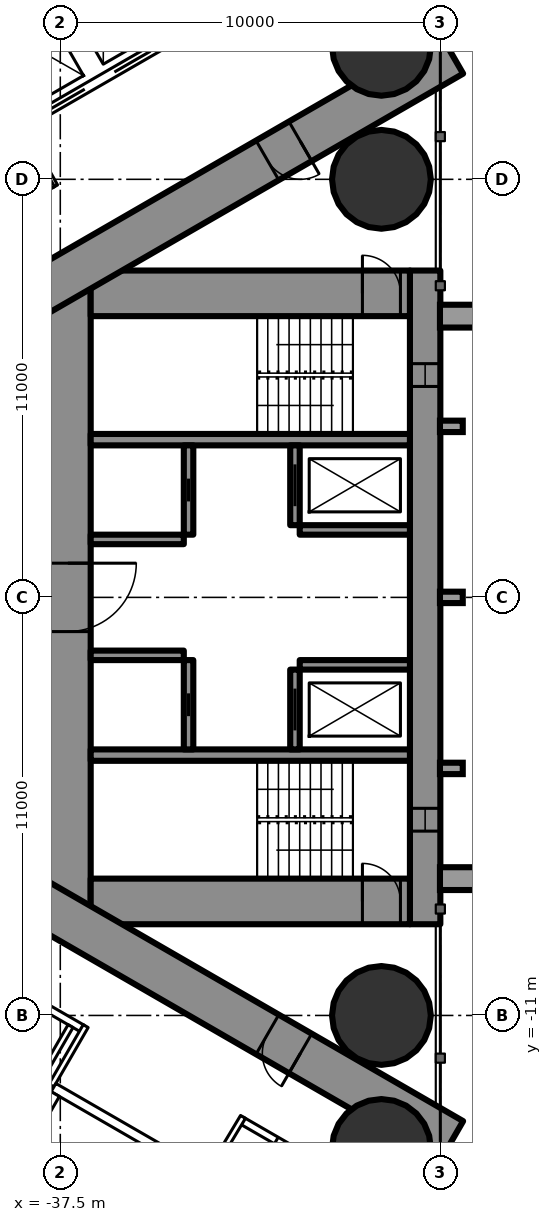
"""IFC4 building model, lengths in metres.
Left out: names, types, materials, properties, quantities, classifications, styles, units other than length and angle.
Written with IfcOpenShell. Run it as: python <this file> out.ifc"""

import sys

from ifc_helpers import new_model, si_unit, direction, frame, frame_2d, origin, origin_2d, place, context, subcontext, project, spatial, rectangle, hollow_circle, extrude, element, fill, save


model = new_model("IFC4")
c1 = context("Model", 3, precision=1e-05, world=origin(), true_north=direction((0.0, 1.0)))
c2 = subcontext(c1, "Body", "Model", "MODEL_VIEW")
j1 = project(units=[si_unit("LENGTHUNIT", "METRE"), si_unit("PLANEANGLEUNIT", "RADIAN")], contexts=[c1])
p1 = place(None, origin())
s1 = spatial("IfcSite", under=j1, at=p1, CompositionType="ELEMENT")
p2 = place(p1, origin())
s2 = spatial("IfcBuilding", under=s1, at=p2, CompositionType="ELEMENT")
p3 = place(p2, frame((0.0, 0.0, 122.1)))
s3 = spatial("IfcBuildingStorey", under=s2, at=p3, CompositionType="ELEMENT", Elevation=122.1)
for number, where, z_axis, x_axis in (
    (1, (-29.05, -11.0, 0.0), (0.0, 0.0, 1.0), (1.0, 0.0, 0.0)),
    (2, (-29.05, 11.0, 0.0), (0.0, 0.0, 1.0), (1.0, 0.0, 0.0)),
    (3, (-29.05, 14.5, 0.0), (0.0, 0.0, 1.0), (1.0, 0.0, 0.0)),
    (4, (-29.05, -14.5, 0.0), (0.0, 0.0, 1.0), (1.0, 0.0, 0.0)),
):
    element("IfcColumn", number, at=place(p3, frame(where, z_axis=z_axis, x_axis=x_axis)), inside=s3, PredefinedType="COLUMN", context=c2, shape_type="SweptSolid", body=[
        extrude(hollow_circle(Radius=1.3, WallThickness=0.1, at=origin_2d()), origin(), (0.0, 0.0, 1.0), 3.5),
    ])
p4 = place(p3, frame((-27.9, 8.6, 0.0), z_axis=(0.0, 0.0, 1.0), x_axis=(0.0, -1.0, 0.0)))
e5 = element("IfcWall", 5, at=p4, inside=s3, PredefinedType="SHEAR", context=c2, shape_type="SweptSolid", body=[
    extrude(rectangle(XDim=17.2, YDim=0.8, at=frame_2d((8.6, 0.0))), origin(), (0.0, 0.0, 1.0), 3.5),
])
p5 = place(p4, frame((2.45, 0.0, 0.6)))
e6 = element("IfcOpeningElement", 6, at=p5, cuts=e5, PredefinedType="OPENING", context=c2, shape_type="SweptSolid", body=[
    extrude(rectangle(XDim=0.6, YDim=2.1, at=frame_2d((0.3, 1.05))), frame((0.0, 0.41, 0.0), z_axis=(0.0, -1.0, 0.0), x_axis=(1.0, 0.0, 0.0)), (0.0, 0.0, 1.0), 0.82),
])
p6 = place(p4, frame((14.15, 0.0, 0.6)))
e7 = element("IfcOpeningElement", 7, at=p6, cuts=e5, PredefinedType="OPENING", context=c2, shape_type="SweptSolid", body=[
    extrude(rectangle(XDim=0.6, YDim=2.1, at=frame_2d((0.3, 1.05))), frame((0.0, 0.41, 0.0), z_axis=(0.0, -1.0, 0.0), x_axis=(1.0, 0.0, 0.0)), (0.0, 0.0, 1.0), 0.82),
])
p7 = place(p3, frame((-37.3, 8.6, 0.0), z_axis=(0.0, 0.0, 1.0), x_axis=(0.0, -1.0, 0.0)))
e8 = element("IfcWall", 8, at=p7, inside=s3, PredefinedType="SHEAR", context=c2, shape_type="SweptSolid", body=[
    extrude(rectangle(XDim=17.2, YDim=1.2, at=frame_2d((8.6, 0.0))), origin(), (0.0, 0.0, 1.0), 3.5),
])
p8 = place(p7, frame((7.7, 0.0, 0.0)))
e9 = element("IfcOpeningElement", 9, at=p8, cuts=e8, PredefinedType="OPENING", context=c2, shape_type="SweptSolid", body=[
    extrude(rectangle(XDim=1.8, YDim=2.2, at=frame_2d((0.9, 1.1))), frame((0.0, 0.61, 0.0), z_axis=(0.0, -1.0, 0.0), x_axis=(1.0, 0.0, 0.0)), (0.0, 0.0, 1.0), 1.22),
])
p9 = place(p3, frame((-28.3, 8.0, 0.0), z_axis=(0.0, 0.0, 1.0), x_axis=(-1.0, 0.0, 0.0)))
e10 = element("IfcWall", 10, at=p9, inside=s3, PredefinedType="SHEAR", context=c2, shape_type="SweptSolid", body=[
    extrude(rectangle(XDim=8.4, YDim=1.2, at=frame_2d((4.2, 0.0))), origin(), (0.0, 0.0, 1.0), 3.5),
])
p10 = place(p9, frame((0.25, 0.0, 0.0)))
e11 = element("IfcOpeningElement", 11, at=p10, cuts=e10, PredefinedType="OPENING", context=c2, shape_type="SweptSolid", body=[
    extrude(rectangle(XDim=1.0, YDim=2.2, at=frame_2d((0.5, 1.1))), frame((0.0, 0.61, 0.0), z_axis=(0.0, -1.0, 0.0), x_axis=(1.0, 0.0, 0.0)), (0.0, 0.0, 1.0), 1.22),
])
p11 = place(p3, frame((-28.3, -8.0, 0.0), z_axis=(0.0, 0.0, 1.0), x_axis=(-1.0, 0.0, 0.0)))
e12 = element("IfcWall", 12, at=p11, inside=s3, PredefinedType="SHEAR", context=c2, shape_type="SweptSolid", body=[
    extrude(rectangle(XDim=8.4, YDim=1.2, at=frame_2d((4.2, 0.0))), origin(), (0.0, 0.0, 1.0), 3.5),
])
p12 = place(p11, frame((0.25, 0.0, 0.0)))
e13 = element("IfcOpeningElement", 13, at=p12, cuts=e12, PredefinedType="OPENING", context=c2, shape_type="SweptSolid", body=[
    extrude(rectangle(XDim=1.0, YDim=2.2, at=frame_2d((0.5, 1.1))), frame((0.0, 0.61, 0.0), z_axis=(0.0, -1.0, 0.0), x_axis=(1.0, 0.0, 0.0)), (0.0, 0.0, 1.0), 1.22),
])
for number, where, z_axis, x_axis in (
    (14, (-28.3, 4.15, 0.0), (0.0, 0.0, 1.0), (-1.0, 0.0, 0.0)),
    (15, (-28.3, -4.15, 0.0), (0.0, 0.0, 1.0), (-1.0, 0.0, 0.0)),
):
    element("IfcWall", number, at=place(p3, frame(where, z_axis=z_axis, x_axis=x_axis)), inside=s3, PredefinedType="SHEAR", context=c2, shape_type="SweptSolid", body=[
        extrude(rectangle(XDim=8.4, YDim=0.3, at=frame_2d((4.2, 0.0))), origin(), (0.0, 0.0, 1.0), 3.5),
    ])
p13 = place(p3, frame((-31.325, 4.0, 0.0), z_axis=(0.0, 0.0, 1.0), x_axis=(0.0, -1.0, 0.0)))
e16 = element("IfcWall", 16, at=p13, inside=s3, PredefinedType="SHEAR", context=c2, shape_type="SweptSolid", body=[
    extrude(rectangle(XDim=2.1, YDim=0.25, at=frame_2d((1.05, 0.0))), origin(), (0.0, 0.0, 1.0), 3.5),
])
p14 = place(p13, frame((0.5, 0.0, 0.0)))
e17 = element("IfcOpeningElement", 17, at=p14, cuts=e16, PredefinedType="OPENING", context=c2, shape_type="SweptSolid", body=[
    extrude(rectangle(XDim=1.1, YDim=2.2, at=frame_2d((0.55, 1.1))), frame((0.0, 0.135, 0.0), z_axis=(0.0, -1.0, 0.0), x_axis=(1.0, 0.0, 0.0)), (0.0, 0.0, 1.0), 0.27),
])
p15 = place(p3, frame((-34.125, 4.0, 0.0), z_axis=(0.0, 0.0, 1.0), x_axis=(0.0, -1.0, 0.0)))
e18 = element("IfcWall", 18, at=p15, inside=s3, PredefinedType="SHEAR", context=c2, shape_type="SweptSolid", body=[
    extrude(rectangle(XDim=2.35, YDim=0.25, at=frame_2d((1.175, 0.0))), origin(), (0.0, 0.0, 1.0), 3.5),
])
p16 = place(p15, frame((0.875, 0.0, 0.0)))
e19 = element("IfcOpeningElement", 19, at=p16, cuts=e18, PredefinedType="OPENING", context=c2, shape_type="SweptSolid", body=[
    extrude(rectangle(XDim=0.6, YDim=2.0, at=frame_2d((0.3, 1.0))), frame((0.0, 0.135, 0.0), z_axis=(0.0, -1.0, 0.0), x_axis=(1.0, 0.0, 0.0)), (0.0, 0.0, 1.0), 0.27),
])
p17 = place(p3, frame((-28.3, 1.775, 0.0), z_axis=(0.0, 0.0, 1.0), x_axis=(-1.0, 0.0, 0.0)))
e20 = element("IfcWall", 20, at=p17, inside=s3, PredefinedType="SHEAR", context=c2, shape_type="SweptSolid", body=[
    extrude(rectangle(XDim=2.9, YDim=0.25, at=frame_2d((1.45, 0.0))), origin(), (0.0, 0.0, 1.0), 3.5),
])
p18 = place(p3, frame((-34.25, 1.525, 0.0), z_axis=(0.0, 0.0, 1.0), x_axis=(-1.0, 0.0, 0.0)))
e21 = element("IfcWall", 21, at=p18, inside=s3, PredefinedType="SHEAR", context=c2, shape_type="SweptSolid", body=[
    extrude(rectangle(XDim=2.45, YDim=0.25, at=frame_2d((1.225, 0.0))), origin(), (0.0, 0.0, 1.0), 3.5),
])
p19 = place(p3, frame((-31.325, -1.9, 0.0), z_axis=(0.0, 0.0, 1.0), x_axis=(0.0, -1.0, 0.0)))
e22 = element("IfcWall", 22, at=p19, inside=s3, PredefinedType="SHEAR", context=c2, shape_type="SweptSolid", body=[
    extrude(rectangle(XDim=2.1, YDim=0.25, at=frame_2d((1.05, 0.0))), origin(), (0.0, 0.0, 1.0), 3.5),
])
p20 = place(p19, frame((0.5, 0.0, 0.0)))
e23 = element("IfcOpeningElement", 23, at=p20, cuts=e22, PredefinedType="OPENING", context=c2, shape_type="SweptSolid", body=[
    extrude(rectangle(XDim=1.1, YDim=2.2, at=frame_2d((0.55, 1.1))), frame((0.0, 0.135, 0.0), z_axis=(0.0, -1.0, 0.0), x_axis=(1.0, 0.0, 0.0)), (0.0, 0.0, 1.0), 0.27),
])
p21 = place(p3, frame((-34.125, -1.65, 0.0), z_axis=(0.0, 0.0, 1.0), x_axis=(0.0, -1.0, 0.0)))
e24 = element("IfcWall", 24, at=p21, inside=s3, PredefinedType="SHEAR", context=c2, shape_type="SweptSolid", body=[
    extrude(rectangle(XDim=2.35, YDim=0.25, at=frame_2d((1.175, 0.0))), origin(), (0.0, 0.0, 1.0), 3.5),
])
p22 = place(p21, frame((0.875, 0.0, 0.0)))
e25 = element("IfcOpeningElement", 25, at=p22, cuts=e24, PredefinedType="OPENING", context=c2, shape_type="SweptSolid", body=[
    extrude(rectangle(XDim=0.6, YDim=2.0, at=frame_2d((0.3, 1.0))), frame((0.0, 0.135, 0.0), z_axis=(0.0, -1.0, 0.0), x_axis=(1.0, 0.0, 0.0)), (0.0, 0.0, 1.0), 0.27),
])
p23 = place(p3, frame((-28.3, -1.775, 0.0), z_axis=(0.0, 0.0, 1.0), x_axis=(-1.0, 0.0, 0.0)))
e26 = element("IfcWall", 26, at=p23, inside=s3, PredefinedType="SHEAR", context=c2, shape_type="SweptSolid", body=[
    extrude(rectangle(XDim=2.9, YDim=0.25, at=frame_2d((1.45, 0.0))), origin(), (0.0, 0.0, 1.0), 3.5),
])
p24 = place(p3, frame((-34.25, -1.525, 0.0), z_axis=(0.0, 0.0, 1.0), x_axis=(-1.0, 0.0, 0.0)))
e27 = element("IfcWall", 27, at=p24, inside=s3, PredefinedType="SHEAR", context=c2, shape_type="SweptSolid", body=[
    extrude(rectangle(XDim=2.45, YDim=0.25, at=frame_2d((1.225, 0.0))), origin(), (0.0, 0.0, 1.0), 3.5),
])
p25 = place(p3, frame((-27.2, 14.3, 0.0), z_axis=(0.0, 0.0, 1.0), x_axis=(-0.866026593062, -0.499997940104, 0.0)))
e28 = element("IfcWall", 28, at=p25, inside=s3, PredefinedType="SHEAR", context=c2, shape_type="SweptSolid", body=[
    extrude(rectangle(XDim=28.946, YDim=1.2, at=frame_2d((14.473, 0.0))), origin(), (0.0, 0.0, 1.0), 3.5),
])
p26 = place(p25, frame((4.6, 0.0, 0.0)))
e29 = element("IfcOpeningElement", 29, at=p26, cuts=e28, PredefinedType="OPENING", context=c2, shape_type="SweptSolid", body=[
    extrude(rectangle(XDim=1.0, YDim=2.2, at=frame_2d((0.5, 1.1))), frame((0.0, 0.61, 0.0), z_axis=(0.0, -1.0, 0.0), x_axis=(1.0, 0.0, 0.0)), (0.0, 0.0, 1.0), 1.22),
])
p27 = place(p25, frame((13.395, 0.0, 0.0)))
e30 = element("IfcOpeningElement", 30, at=p27, cuts=e28, PredefinedType="OPENING", context=c2, shape_type="SweptSolid", body=[
    extrude(rectangle(XDim=1.8, YDim=2.2, at=frame_2d((0.9, 1.1))), frame((0.0, 0.61, 0.0), z_axis=(0.0, -1.0, 0.0), x_axis=(1.0, 0.0, 0.0)), (0.0, 0.0, 1.0), 1.22),
])
p28 = place(p3, frame((-27.2, -14.3, 0.0), z_axis=(0.0, 0.0, 1.0), x_axis=(-0.866024021859, 0.500002393557, 0.0)))
e31 = element("IfcWall", 31, at=p28, inside=s3, PredefinedType="SHEAR", context=c2, shape_type="SweptSolid", body=[
    extrude(rectangle(XDim=27.907, YDim=1.2, at=frame_2d((13.954, 0.0))), origin(), (0.0, 0.0, 1.0), 3.5),
])
p29 = place(p28, frame((4.6, 0.0, 0.0)))
e32 = element("IfcOpeningElement", 32, at=p29, cuts=e31, PredefinedType="OPENING", context=c2, shape_type="SweptSolid", body=[
    extrude(rectangle(XDim=1.0, YDim=2.2, at=frame_2d((0.5, 1.1))), frame((0.0, 0.61, 0.0), z_axis=(0.0, -1.0, 0.0), x_axis=(1.0, 0.0, 0.0)), (0.0, 0.0, 1.0), 1.22),
])
p30 = place(p28, frame((13.395, 0.0, 0.0)))
e33 = element("IfcOpeningElement", 33, at=p30, cuts=e31, PredefinedType="OPENING", context=c2, shape_type="SweptSolid", body=[
    extrude(rectangle(XDim=1.8, YDim=2.2, at=frame_2d((0.9, 1.1))), frame((0.0, 0.61, 0.0), z_axis=(0.0, -1.0, 0.0), x_axis=(1.0, 0.0, 0.0)), (0.0, 0.0, 1.0), 1.22),
])
p31 = place(p3, frame((-27.572, -16.741, 0.0), z_axis=(0.0, 0.0, 1.0), x_axis=(-0.866024464444, 0.500001626982, 0.0)))
e34 = element("IfcWall", 34, at=p31, inside=s3, PredefinedType="PARTITIONING", context=c2, shape_type="SweptSolid", body=[
    extrude(rectangle(XDim=5.955, YDim=0.2, at=frame_2d((2.978, 0.0))), origin(), (0.0, 0.0, 1.0), 3.25),
])
p32 = place(p31, frame((3.95, 0.0, 0.0)))
e35 = element("IfcOpeningElement", 35, at=p32, cuts=e34, PredefinedType="OPENING", context=c2, shape_type="SweptSolid", body=[
    extrude(rectangle(XDim=0.95, YDim=2.2, at=frame_2d((0.475, 1.1))), frame((0.0, 0.11, 0.0), z_axis=(0.0, -1.0, 0.0), x_axis=(1.0, 0.0, 0.0)), (0.0, 0.0, 1.0), 0.22),
])
p33 = place(p3, frame((-36.92, -11.344, 0.0), z_axis=(0.0, 0.0, 1.0), x_axis=(-0.866028313256, 0.499994960614, 0.0)))
e36 = element("IfcWall", 36, at=p33, inside=s3, PredefinedType="PARTITIONING", context=c2, shape_type="SweptSolid", body=[
    extrude(rectangle(XDim=22.568, YDim=0.2, at=frame_2d((11.284, 0.0))), origin(), (0.0, 0.0, 1.0), 3.25),
])
p34 = place(p33, frame((12.131, 0.0, 0.0)))
e37 = element("IfcOpeningElement", 37, at=p34, cuts=e36, PredefinedType="OPENING", context=c2, shape_type="SweptSolid", body=[
    extrude(rectangle(XDim=0.95, YDim=2.2, at=frame_2d((0.475, 1.1))), frame((0.0, 0.11, 0.0), z_axis=(0.0, -1.0, 0.0), x_axis=(1.0, 0.0, 0.0)), (0.0, 0.0, 1.0), 0.22),
])
p35 = place(p33, frame((3.35, 0.0, 0.0)))
e38 = element("IfcOpeningElement", 38, at=p35, cuts=e36, PredefinedType="OPENING", context=c2, shape_type="SweptSolid", body=[
    extrude(rectangle(XDim=1.0, YDim=2.2, at=frame_2d((0.5, 1.1))), frame((0.0, 0.11, 0.0), z_axis=(0.0, -1.0, 0.0), x_axis=(1.0, 0.0, 0.0)), (0.0, 0.0, 1.0), 0.22),
])
p36 = place(p3, frame((-38.513, 12.392, 0.0), z_axis=(0.0, 0.0, 1.0), x_axis=(0.485585508183, -0.874189175317, 0.0)))
e39 = element("IfcWall", 39, at=p36, inside=s3, PredefinedType="PARTITIONING", context=c2, shape_type="SweptSolid", body=[
    extrude(rectangle(XDim=1.805, YDim=0.15, at=frame_2d((0.902, 0.0))), origin(), (0.0, 0.0, 1.0), 3.25),
])
p37 = place(p3, frame((-36.831, -11.28, 0.0), z_axis=(0.0, 0.0, 1.0), x_axis=(-0.499937177781, -0.866061671171, 0.0)))
e40 = element("IfcWall", 40, at=p37, inside=s3, PredefinedType="PARTITIONING", context=c2, shape_type="SweptSolid", body=[
    extrude(rectangle(XDim=1.804, YDim=0.15, at=frame_2d((0.902, 0.0))), origin(), (0.0, 0.0, 1.0), 3.25),
])
p38 = place(p3, frame((-33.621, -15.218, 0.0), z_axis=(0.0, 0.0, 1.0), x_axis=(0.514336634837, 0.857588377991, 0.0)))
e41 = element("IfcWall", 41, at=p38, inside=s3, PredefinedType="PARTITIONING", context=c2, shape_type="SweptSolid", body=[
    extrude(rectangle(XDim=1.805, YDim=0.15, at=frame_2d((0.903, 0.0))), origin(), (0.0, 0.0, 1.0), 3.25),
])
p39 = place(p3, frame((-37.7, 10.894, 0.0), z_axis=(0.0, 0.0, 1.0), x_axis=(-0.866027551079, -0.499996280759, 0.0)))
e42 = element("IfcWall", 42, at=p39, inside=s3, PredefinedType="PARTITIONING", context=c2, shape_type="SweptSolid", body=[
    extrude(rectangle(XDim=10.831, YDim=0.2, at=frame_2d((5.415, 0.0))), origin(), (0.0, 0.0, 1.0), 3.25),
])
p40 = place(p39, frame((6.93, 0.0, 0.0)))
e43 = element("IfcOpeningElement", 43, at=p40, cuts=e42, PredefinedType="OPENING", context=c2, shape_type="SweptSolid", body=[
    extrude(rectangle(XDim=0.95, YDim=2.2, at=frame_2d((0.475, 1.1))), frame((0.0, 0.11, 0.0), z_axis=(0.0, -1.0, 0.0), x_axis=(1.0, 0.0, 0.0)), (0.0, 0.0, 1.0), 0.22),
])
p41 = place(p3, frame((-37.23, -11.281, 0.0), z_axis=(0.0, 0.0, 1.0), x_axis=(-0.500049511043, -0.865996816683, 0.0)))
e44 = element("IfcWall", 44, at=p41, inside=s3, PredefinedType="PARTITIONING", context=c2, shape_type="SweptSolid", body=[
    extrude(rectangle(XDim=2.8, YDim=0.15, at=frame_2d((1.4, 0.0))), origin(), (0.0, 0.0, 1.0), 3.25),
])
p42 = place(p3, frame((-31.01, 16.747, 0.0), z_axis=(0.0, 0.0, 1.0), x_axis=(-0.866028165386, -0.499995216735, 0.0)))
e45 = element("IfcWall", 45, at=p42, inside=s3, PredefinedType="PARTITIONING", context=c2, shape_type="SweptSolid", body=[
    extrude(rectangle(XDim=8.6, YDim=0.25, at=frame_2d((4.3, 0.0))), origin(), (0.0, 0.0, 1.0), 3.25),
])
p43 = place(p42, frame((0.75, 0.0, 0.0)))
e46 = element("IfcOpeningElement", 46, at=p43, cuts=e45, PredefinedType="OPENING", context=c2, shape_type="SweptSolid", body=[
    extrude(rectangle(XDim=1.1, YDim=2.2, at=frame_2d((0.55, 1.1))), frame((0.0, 0.135, 0.0), z_axis=(0.0, -1.0, 0.0), x_axis=(1.0, 0.0, 0.0)), (0.0, 0.0, 1.0), 0.27),
])
p44 = place(p42, frame((2.75, 0.0, 0.0)))
e47 = element("IfcOpeningElement", 47, at=p44, cuts=e45, PredefinedType="OPENING", context=c2, shape_type="SweptSolid", body=[
    extrude(rectangle(XDim=1.1, YDim=2.2, at=frame_2d((0.55, 1.1))), frame((0.0, 0.135, 0.0), z_axis=(0.0, -1.0, 0.0), x_axis=(1.0, 0.0, 0.0)), (0.0, 0.0, 1.0), 0.27),
])
p45 = place(p42, frame((4.75, 0.0, 0.0)))
e48 = element("IfcOpeningElement", 48, at=p45, cuts=e45, PredefinedType="OPENING", context=c2, shape_type="SweptSolid", body=[
    extrude(rectangle(XDim=1.1, YDim=2.2, at=frame_2d((0.55, 1.1))), frame((0.0, 0.135, 0.0), z_axis=(0.0, -1.0, 0.0), x_axis=(1.0, 0.0, 0.0)), (0.0, 0.0, 1.0), 0.27),
])
p46 = place(p42, frame((6.75, 0.0, 0.0)))
e49 = element("IfcOpeningElement", 49, at=p46, cuts=e45, PredefinedType="OPENING", context=c2, shape_type="SweptSolid", body=[
    extrude(rectangle(XDim=1.1, YDim=2.2, at=frame_2d((0.55, 1.1))), frame((0.0, 0.135, 0.0), z_axis=(0.0, -1.0, 0.0), x_axis=(1.0, 0.0, 0.0)), (0.0, 0.0, 1.0), 0.27),
])
p47 = place(p3, frame((-33.696, -15.197, 0.0), z_axis=(0.0, 0.0, 1.0), x_axis=(-0.865976953817, 0.500083908417, 0.0)))
e50 = element("IfcWall", 50, at=p47, inside=s3, PredefinedType="PARTITIONING", context=c2, shape_type="SweptSolid", body=[
    extrude(rectangle(XDim=4.599, YDim=0.25, at=frame_2d((2.3, 0.0))), origin(), (0.0, 0.0, 1.0), 3.25),
])
p48 = place(p3, frame((-37.633, -13.068, 0.0), z_axis=(0.0, 0.0, 1.0), x_axis=(-0.499872130319, -0.866099216793, 0.0)))
e51 = element("IfcWall", 51, at=p48, inside=s3, PredefinedType="PARTITIONING", context=c2, shape_type="SweptSolid", body=[
    extrude(rectangle(XDim=3.2, YDim=0.25, at=frame_2d((1.6, 0.0))), origin(), (0.0, 0.0, 1.0), 3.25),
])
p49 = place(p32, origin())
e52 = element("IfcDoor", 52, at=p49, inside=s3, OperationType="SINGLE_SWING_LEFT", PredefinedType="DOOR", context=c2, shape_type="SweptSolid", body=[
    extrude(rectangle(XDim=0.95, YDim=2.2, at=frame_2d((0.475, 1.1))), frame((0.0, 0.025, 0.0), z_axis=(0.0, -1.0, 0.0), x_axis=(1.0, 0.0, 0.0)), (0.0, 0.0, 1.0), 0.05),
])
fill(e35, e52)
p50 = place(p26, origin())
e53 = element("IfcDoor", 53, at=p50, inside=s3, OperationType="SINGLE_SWING_LEFT", PredefinedType="DOOR", context=c2, shape_type="SweptSolid", body=[
    extrude(rectangle(XDim=1.0, YDim=2.2, at=frame_2d((0.5, 1.1))), frame((0.0, 0.025, 0.0), z_axis=(0.0, -1.0, 0.0), x_axis=(1.0, 0.0, 0.0)), (0.0, 0.0, 1.0), 0.05),
])
fill(e29, e53)
p51 = place(p29, origin())
e54 = element("IfcDoor", 54, at=p51, inside=s3, OperationType="SINGLE_SWING_LEFT", PredefinedType="DOOR", context=c2, shape_type="SweptSolid", body=[
    extrude(rectangle(XDim=1.0, YDim=2.2, at=frame_2d((0.5, 1.1))), frame((0.0, 0.025, 0.0), z_axis=(0.0, -1.0, 0.0), x_axis=(1.0, 0.0, 0.0)), (0.0, 0.0, 1.0), 0.05),
])
fill(e32, e54)
p52 = place(p8, origin())
e55 = element("IfcDoor", 55, at=p52, inside=s3, OperationType="DOUBLE_DOOR_SINGLE_SWING", PredefinedType="DOOR", context=c2, shape_type="SweptSolid", body=[
    extrude(rectangle(XDim=1.8, YDim=2.2, at=frame_2d((0.9, 1.1))), frame((0.0, 0.025, 0.0), z_axis=(0.0, -1.0, 0.0), x_axis=(1.0, 0.0, 0.0)), (0.0, 0.0, 1.0), 0.05),
])
fill(e9, e55)
p53 = place(p10, origin())
e56 = element("IfcDoor", 56, at=p53, inside=s3, OperationType="SINGLE_SWING_RIGHT", PredefinedType="DOOR", context=c2, shape_type="SweptSolid", body=[
    extrude(rectangle(XDim=1.0, YDim=2.2, at=frame_2d((0.5, 1.1))), frame((0.0, 0.025, 0.0), z_axis=(0.0, -1.0, 0.0), x_axis=(1.0, 0.0, 0.0)), (0.0, 0.0, 1.0), 0.05),
])
fill(e11, e56)
p54 = place(p12, origin())
e57 = element("IfcDoor", 57, at=p54, inside=s3, OperationType="SINGLE_SWING_RIGHT", PredefinedType="DOOR", context=c2, shape_type="SweptSolid", body=[
    extrude(rectangle(XDim=1.0, YDim=2.2, at=frame_2d((0.5, 1.1))), frame((0.0, 0.025, 0.0), z_axis=(0.0, -1.0, 0.0), x_axis=(1.0, 0.0, 0.0)), (0.0, 0.0, 1.0), 0.05),
])
fill(e13, e57)
p55 = place(p14, origin())
e58 = element("IfcDoor", 58, at=p55, inside=s3, OperationType="SLIDING_TO_LEFT", PredefinedType="USERDEFINED", context=c2, shape_type="SweptSolid", body=[
    extrude(rectangle(XDim=1.1, YDim=2.2, at=frame_2d((0.55, 1.1))), frame((0.0, 0.025, 0.0), z_axis=(0.0, -1.0, 0.0), x_axis=(1.0, 0.0, 0.0)), (0.0, 0.0, 1.0), 0.05),
])
fill(e17, e58)
p56 = place(p20, origin())
e59 = element("IfcDoor", 59, at=p56, inside=s3, OperationType="SLIDING_TO_LEFT", PredefinedType="USERDEFINED", context=c2, shape_type="SweptSolid", body=[
    extrude(rectangle(XDim=1.1, YDim=2.2, at=frame_2d((0.55, 1.1))), frame((0.0, 0.025, 0.0), z_axis=(0.0, -1.0, 0.0), x_axis=(1.0, 0.0, 0.0)), (0.0, 0.0, 1.0), 0.05),
])
fill(e23, e59)
p57 = place(p16, origin())
e60 = element("IfcDoor", 60, at=p57, inside=s3, OperationType="SLIDING_TO_LEFT", PredefinedType="DOOR", context=c2, shape_type="SweptSolid", body=[
    extrude(rectangle(XDim=0.6, YDim=2.0, at=frame_2d((0.3, 1.0))), frame((0.0, 0.025, 0.0), z_axis=(0.0, -1.0, 0.0), x_axis=(1.0, 0.0, 0.0)), (0.0, 0.0, 1.0), 0.05),
])
fill(e19, e60)
p58 = place(p22, origin())
e61 = element("IfcDoor", 61, at=p58, inside=s3, OperationType="SLIDING_TO_LEFT", PredefinedType="DOOR", context=c2, shape_type="SweptSolid", body=[
    extrude(rectangle(XDim=0.6, YDim=2.0, at=frame_2d((0.3, 1.0))), frame((0.0, 0.025, 0.0), z_axis=(0.0, -1.0, 0.0), x_axis=(1.0, 0.0, 0.0)), (0.0, 0.0, 1.0), 0.05),
])
fill(e25, e61)
p59 = place(p45, origin())
e62 = element("IfcDoor", 62, at=p59, inside=s3, OperationType="DOUBLE_DOOR_SLIDING", PredefinedType="USERDEFINED", context=c2, shape_type="SweptSolid", body=[
    extrude(rectangle(XDim=1.1, YDim=2.2, at=frame_2d((0.55, 1.1))), frame((0.0, 0.025, 0.0), z_axis=(0.0, -1.0, 0.0), x_axis=(1.0, 0.0, 0.0)), (0.0, 0.0, 1.0), 0.05),
])
fill(e48, e62)
p60 = place(p46, origin())
e63 = element("IfcDoor", 63, at=p60, inside=s3, OperationType="DOUBLE_DOOR_SLIDING", PredefinedType="USERDEFINED", context=c2, shape_type="SweptSolid", body=[
    extrude(rectangle(XDim=1.1, YDim=2.2, at=frame_2d((0.55, 1.1))), frame((0.0, 0.025, 0.0), z_axis=(0.0, -1.0, 0.0), x_axis=(1.0, 0.0, 0.0)), (0.0, 0.0, 1.0), 0.05),
])
fill(e49, e63)
p61 = place(p5, origin())
e64 = element("IfcWindow", 64, at=p61, inside=s3, PartitioningType="SINGLE_PANEL", PredefinedType="WINDOW", context=c2, shape_type="SweptSolid", body=[
    extrude(rectangle(XDim=0.6, YDim=2.1, at=frame_2d((0.3, 1.05))), frame((0.0, 0.03, 0.0), z_axis=(0.0, -1.0, 0.0), x_axis=(1.0, 0.0, 0.0)), (0.0, 0.0, 1.0), 0.06),
])
fill(e6, e64)
p62 = place(p6, origin())
e65 = element("IfcWindow", 65, at=p62, inside=s3, PartitioningType="SINGLE_PANEL", PredefinedType="WINDOW", context=c2, shape_type="SweptSolid", body=[
    extrude(rectangle(XDim=0.6, YDim=2.1, at=frame_2d((0.3, 1.05))), frame((0.0, 0.03, 0.0), z_axis=(0.0, -1.0, 0.0), x_axis=(1.0, 0.0, 0.0)), (0.0, 0.0, 1.0), 0.06),
])
fill(e7, e65)
save(model, sys.argv[1])
